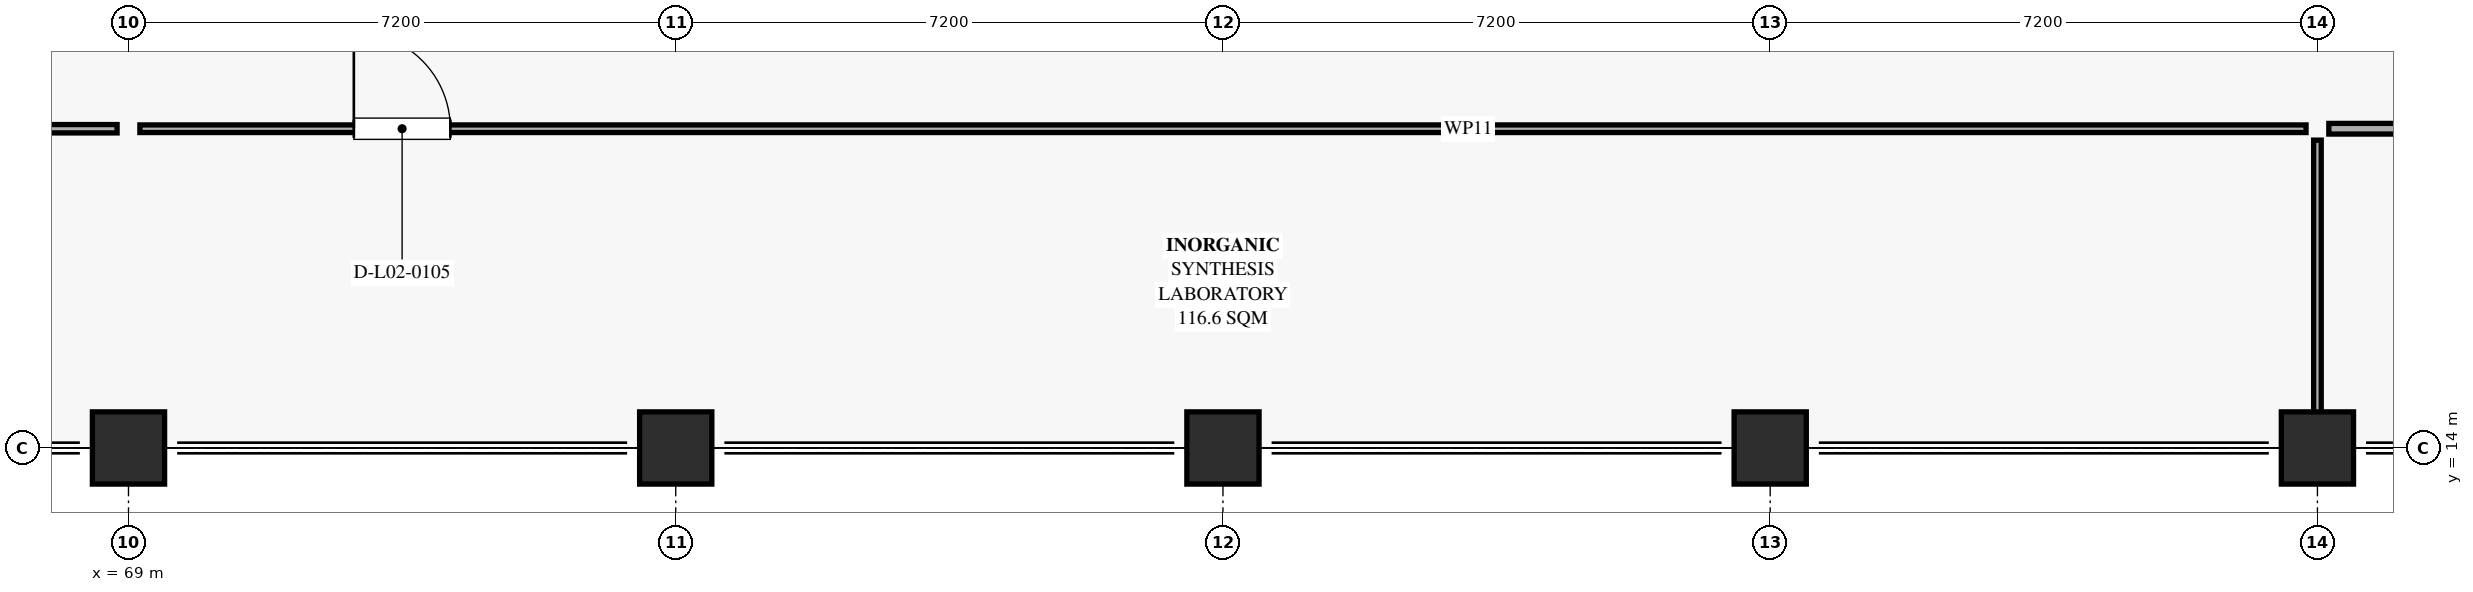
"""IFC4 building model, lengths in metres.
Left out: names, types, materials, properties, quantities, classifications, styles, units other than length and angle.
Written with IfcOpenShell. Run it as: python <this file> out.ifc"""

import sys

from ifc_helpers import new_model, si_unit, direction, frame, frame_2d, origin, origin_2d, place, context, subcontext, project, spatial, rectangle, extrude, element, fill, save


model = new_model("IFC4")
c1 = context("Model", 3, precision=1e-05, world=origin(), true_north=direction((0.0, 1.0)))
c2 = subcontext(c1, "Body", "Model", "MODEL_VIEW")
j1 = project(units=[si_unit("LENGTHUNIT", "METRE"), si_unit("PLANEANGLEUNIT", "RADIAN")], contexts=[c1])
p1 = place(None, origin())
s1 = spatial("IfcSite", under=j1, at=p1, CompositionType="ELEMENT")
p2 = place(p1, origin())
s2 = spatial("IfcBuilding", under=s1, at=p2, CompositionType="ELEMENT")
p3 = place(p2, frame((0.0, 0.0, 10.44)))
s3 = spatial("IfcBuildingStorey", under=s2, at=p3, CompositionType="ELEMENT", Elevation=10.44)
for number, where, z_axis, x_axis in (
    (1, (69.0, 14.0, 0.0), (0.0, 0.0, 1.0), (1.0, 0.0, 0.0)),
    (2, (76.2, 14.0, 0.0), (0.0, 0.0, 1.0), (1.0, 0.0, 0.0)),
    (3, (83.4, 14.0, 0.0), (0.0, 0.0, 1.0), (1.0, 0.0, 0.0)),
    (4, (90.6, 14.0, 0.0), (0.0, 0.0, 1.0), (1.0, 0.0, 0.0)),
    (5, (97.8, 14.0, 0.0), (0.0, 0.0, 1.0), (1.0, 0.0, 0.0)),
):
    element("IfcColumn", number, at=place(p3, frame(where, z_axis=z_axis, x_axis=x_axis)), inside=s3, PredefinedType="COLUMN", context=c2, shape_type="SweptSolid", body=[
        extrude(rectangle(XDim=0.95, YDim=0.95, at=origin_2d()), origin(), (0.0, 0.0, 1.0), 4.68),
    ])
p4 = place(p3, frame((54.95, 18.2, 0.0), z_axis=(0.0, 0.0, 1.0), x_axis=(1.0, 0.0, 0.0)))
e6 = element("IfcWall", 6, at=p4, inside=s3, PredefinedType="PARTITIONING", context=c2, shape_type="SweptSolid", body=[
    extrude(rectangle(XDim=13.9, YDim=0.11, at=frame_2d((6.95, 0.0))), origin(), (0.0, 0.0, 1.0), 3.16),
])
p5 = place(p4, frame((2.615, 0.0, 0.0)))
e7 = element("IfcOpeningElement", 7, at=p5, cuts=e6, PredefinedType="OPENING", context=c2, shape_type="SweptSolid", body=[
    extrude(rectangle(XDim=1.27, YDim=2.16, at=frame_2d((0.635, 1.08))), frame((0.0, 0.065, 0.0), z_axis=(0.0, -1.0, 0.0), x_axis=(1.0, 0.0, 0.0)), (0.0, 0.0, 1.0), 0.13),
])
p6 = place(p3, frame((69.15, 18.2, 0.0), z_axis=(0.0, 0.0, 1.0), x_axis=(1.0, 0.0, 0.0)))
e8 = element("IfcWall", 8, at=p6, inside=s3, PredefinedType="PARTITIONING", context=c2, shape_type="SweptSolid", body=[
    extrude(rectangle(XDim=28.5, YDim=0.1, at=frame_2d((14.25, 0.0))), origin(), (0.0, 0.0, 1.0), 3.16),
])
p7 = place(p6, frame((2.815, 0.0, 0.0)))
e9 = element("IfcOpeningElement", 9, at=p7, cuts=e8, PredefinedType="OPENING", context=c2, shape_type="SweptSolid", body=[
    extrude(rectangle(XDim=1.27, YDim=2.22, at=frame_2d((0.635, 1.11))), frame((0.0, 0.06, 0.0), z_axis=(0.0, -1.0, 0.0), x_axis=(1.0, 0.0, 0.0)), (0.0, 0.0, 1.0), 0.12),
])
p8 = place(p3, frame((97.8, 18.05, 0.0), z_axis=(0.0, 0.0, 1.0), x_axis=(0.0, -1.0, 0.0)))
e10 = element("IfcWall", 10, at=p8, inside=s3, PredefinedType="PARTITIONING", context=c2, shape_type="SweptSolid", body=[
    extrude(rectangle(XDim=3.75, YDim=0.1, at=frame_2d((1.875, 0.0))), origin(), (0.0, 0.0, 1.0), 3.16),
])
p9 = place(p3, frame((97.95, 18.2, 0.0), z_axis=(0.0, 0.0, 1.0), x_axis=(1.0, 0.0, 0.0)))
e11 = element("IfcWall", 11, at=p9, inside=s3, PredefinedType="PARTITIONING", context=c2, shape_type="SweptSolid", body=[
    extrude(rectangle(XDim=21.1, YDim=0.14, at=frame_2d((10.55, 0.0))), origin(), (0.0, 0.0, 1.0), 3.16),
])
p10 = place(p9, frame((17.19, 0.0, 0.0)))
e12 = element("IfcOpeningElement", 12, at=p10, cuts=e11, PredefinedType="OPENING", context=c2, shape_type="SweptSolid", body=[
    extrude(rectangle(XDim=1.32, YDim=2.05, at=frame_2d((0.66, 1.025))), frame((0.0, 0.08, 0.0), z_axis=(0.0, -1.0, 0.0), x_axis=(1.0, 0.0, 0.0)), (0.0, 0.0, 1.0), 0.16),
])
p11 = place(p7, origin())
e13 = element("IfcDoor", 13, at=p11, inside=s3, OperationType="SINGLE_SWING_LEFT", PredefinedType="DOOR", context=c2, shape_type="SweptSolid", body=[
    extrude(rectangle(XDim=1.27, YDim=2.22, at=frame_2d((0.635, 1.11))), frame((0.0, 0.025, 0.0), z_axis=(0.0, -1.0, 0.0), x_axis=(1.0, 0.0, 0.0)), (0.0, 0.0, 1.0), 0.05),
])
fill(e9, e13)
save(model, sys.argv[1])
